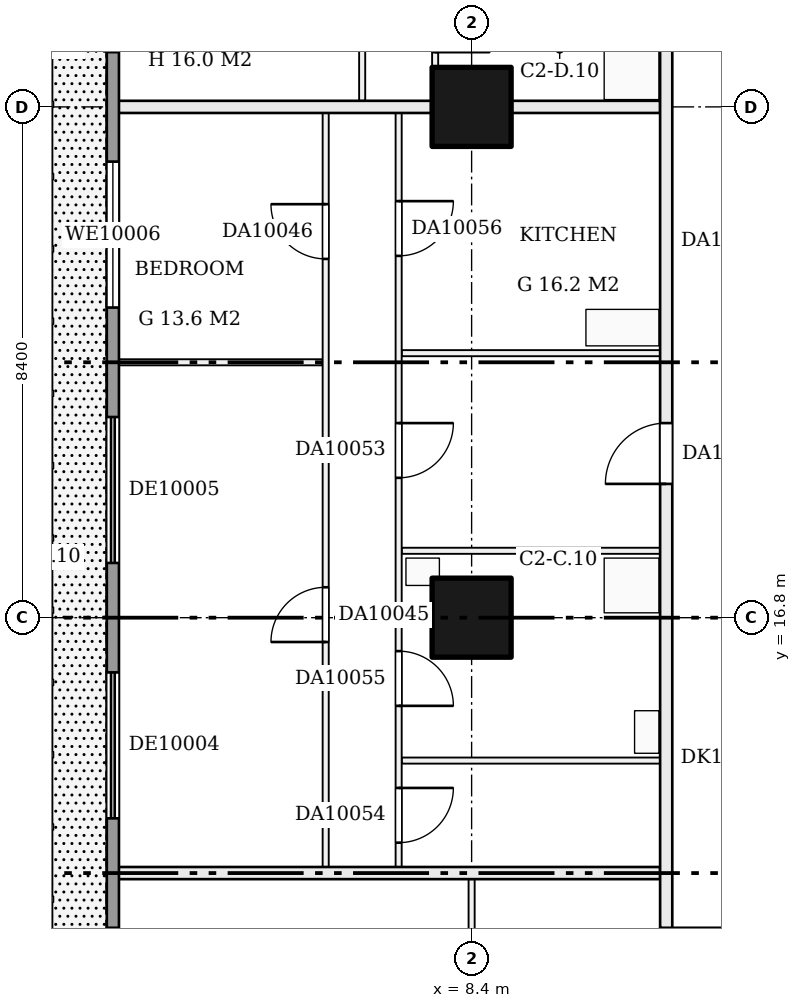
"""IFC4 building model, lengths in metres.
Left out: names, types, materials, properties, quantities, classifications, styles, units other than length and angle.
Written with IfcOpenShell. Run it as: python <this file> out.ifc"""

import sys

from ifc_helpers import new_model, si_unit, direction, frame, frame_2d, origin, origin_2d, place, context, subcontext, project, spatial, rectangle, extrude, element, fill, save


model = new_model("IFC4")
c1 = context("Model", 3, precision=1e-05, world=origin(), true_north=direction((0.0, 1.0)))
c2 = subcontext(c1, "Body", "Model", "MODEL_VIEW")
j1 = project(units=[si_unit("LENGTHUNIT", "METRE"), si_unit("PLANEANGLEUNIT", "RADIAN")], contexts=[c1])
p1 = place(None, origin())
s1 = spatial("IfcSite", under=j1, at=p1, CompositionType="ELEMENT")
p2 = place(p1, origin())
s2 = spatial("IfcBuilding", under=s1, at=p2, CompositionType="ELEMENT")
p3 = place(p2, frame((0.0, 0.0, 46.2)))
s3 = spatial("IfcBuildingStorey", under=s2, at=p3, CompositionType="ELEMENT", Elevation=46.2)
for number, where, z_axis, x_axis in (
    (1, (8.4, 16.8, 0.0), (0.0, 0.0, 1.0), (1.0, 0.0, 0.0)),
    (2, (8.4, 25.2, 0.0), (0.0, 0.0, 1.0), (1.0, 0.0, 0.0)),
):
    element("IfcColumn", number, at=place(p3, frame(where, z_axis=z_axis, x_axis=x_axis)), inside=s3, PredefinedType="COLUMN", context=c2, shape_type="SweptSolid", body=[
        extrude(rectangle(XDim=1.3, YDim=1.3, at=origin_2d()), origin(), (0.0, 0.0, 1.0), 3.22),
    ])
p4 = place(p3, frame((11.5, 11.6, 0.0), z_axis=(0.0, 0.0, 1.0), x_axis=(1.0, 0.0, 0.0)))
e3 = element("IfcWall", 3, at=p4, inside=s3, PredefinedType="PARTITIONING", context=c2, shape_type="SweptSolid", body=[
    extrude(rectangle(XDim=30.5, YDim=0.2, at=frame_2d((15.25, 0.0))), origin(), (0.0, 0.0, 1.0), 3.22),
])
p5 = place(p4, frame((1.6, 0.0, 0.0)))
e4 = element("IfcOpeningElement", 4, at=p5, cuts=e3, PredefinedType="OPENING", context=c2, shape_type="SweptSolid", body=[
    extrude(rectangle(XDim=1.0, YDim=2.1, at=frame_2d((0.5, 1.05))), frame((0.0, 0.11, 0.0), z_axis=(0.0, -1.0, 0.0), x_axis=(1.0, 0.0, 0.0)), (0.0, 0.0, 1.0), 0.22),
])
p6 = place(p4, frame((6.0, 0.0, 0.0)))
e5 = element("IfcOpeningElement", 5, at=p6, cuts=e3, PredefinedType="OPENING", context=c2, shape_type="SweptSolid", body=[
    extrude(rectangle(XDim=1.0, YDim=2.1, at=frame_2d((0.5, 1.05))), frame((0.0, 0.11, 0.0), z_axis=(0.0, -1.0, 0.0), x_axis=(1.0, 0.0, 0.0)), (0.0, 0.0, 1.0), 0.22),
])
p7 = place(p4, frame((14.7, 0.0, 0.0)))
e6 = element("IfcOpeningElement", 6, at=p7, cuts=e3, PredefinedType="OPENING", context=c2, shape_type="SweptSolid", body=[
    extrude(rectangle(XDim=1.0, YDim=2.1, at=frame_2d((0.5, 1.05))), frame((0.0, 0.11, 0.0), z_axis=(0.0, -1.0, 0.0), x_axis=(1.0, 0.0, 0.0)), (0.0, 0.0, 1.0), 0.22),
])
p8 = place(p4, frame((29.04, 0.0, 0.0)))
e7 = element("IfcOpeningElement", 7, at=p8, cuts=e3, PredefinedType="OPENING", context=c2, shape_type="SweptSolid", body=[
    extrude(rectangle(XDim=1.0, YDim=2.1, at=frame_2d((0.5, 1.05))), frame((0.0, 0.11, 0.0), z_axis=(0.0, -1.0, 0.0), x_axis=(1.0, 0.0, 0.0)), (0.0, 0.0, 1.0), 0.22),
])
p9 = place(p3, frame((2.5, 12.6, 0.0), z_axis=(0.0, 0.0, 1.0), x_axis=(1.0, 0.0, 0.0)))
e8 = element("IfcWall", 8, at=p9, inside=s3, PredefinedType="PARTITIONING", context=c2, shape_type="SweptSolid", body=[
    extrude(rectangle(XDim=9.0, YDim=0.2, at=frame_2d((4.5, 0.0))), origin(), (0.0, 0.0, 1.0), 3.22),
])
for number, where, z_axis, x_axis in (
    (9, (7.25, 14.45, 0.0), (0.0, 0.0, 1.0), (1.0, 0.0, 0.0)),
    (10, (7.25, 17.9, 0.0), (0.0, 0.0, 1.0), (1.0, 0.0, 0.0)),
):
    element("IfcWall", number, at=place(p3, frame(where, z_axis=z_axis, x_axis=x_axis)), inside=s3, PredefinedType="PARTITIONING", context=c2, shape_type="SweptSolid", body=[
        extrude(rectangle(XDim=4.25, YDim=0.1, at=frame_2d((2.125, 0.0))), origin(), (0.0, 0.0, 1.0), 3.22),
    ])
p10 = place(p3, frame((2.5, 21.0, 0.0), z_axis=(0.0, 0.0, 1.0), x_axis=(1.0, 0.0, 0.0)))
e11 = element("IfcWall", 11, at=p10, inside=s3, PredefinedType="PARTITIONING", context=c2, shape_type="SweptSolid", body=[
    extrude(rectangle(XDim=3.45, YDim=0.1, at=frame_2d((1.725, 0.0))), origin(), (0.0, 0.0, 1.0), 3.22),
])
p11 = place(p3, frame((7.25, 21.15, 0.0), z_axis=(0.0, 0.0, 1.0), x_axis=(1.0, 0.0, 0.0)))
e12 = element("IfcWall", 12, at=p11, inside=s3, PredefinedType="PARTITIONING", context=c2, shape_type="SweptSolid", body=[
    extrude(rectangle(XDim=4.25, YDim=0.1, at=frame_2d((2.125, 0.0))), origin(), (0.0, 0.0, 1.0), 3.22),
])
p12 = place(p3, frame((2.5, 25.2, 0.0), z_axis=(0.0, 0.0, 1.0), x_axis=(1.0, 0.0, 0.0)))
e13 = element("IfcWall", 13, at=p12, inside=s3, PredefinedType="PARTITIONING", context=c2, shape_type="SweptSolid", body=[
    extrude(rectangle(XDim=9.0, YDim=0.2, at=frame_2d((4.5, 0.0))), origin(), (0.0, 0.0, 1.0), 3.22),
])
p13 = place(p3, frame((6.0, 12.7, 0.0), z_axis=(0.0, 0.0, 1.0), x_axis=(0.0, 1.0, 0.0)))
e14 = element("IfcWall", 14, at=p13, inside=s3, PredefinedType="PARTITIONING", context=c2, shape_type="SweptSolid", body=[
    extrude(rectangle(XDim=12.4, YDim=0.1, at=frame_2d((6.2, 0.0))), origin(), (0.0, 0.0, 1.0), 3.22),
])
p14 = place(p13, frame((3.7, 0.0, 0.0)))
e15 = element("IfcOpeningElement", 15, at=p14, cuts=e14, PredefinedType="OPENING", context=c2, shape_type="SweptSolid", body=[
    extrude(rectangle(XDim=0.9, YDim=2.1, at=frame_2d((0.45, 1.05))), frame((0.0, 0.06, 0.0), z_axis=(0.0, -1.0, 0.0), x_axis=(1.0, 0.0, 0.0)), (0.0, 0.0, 1.0), 0.12),
])
p15 = place(p13, frame((10.0, 0.0, 0.0)))
e16 = element("IfcOpeningElement", 16, at=p15, cuts=e14, PredefinedType="OPENING", context=c2, shape_type="SweptSolid", body=[
    extrude(rectangle(XDim=0.9, YDim=2.1, at=frame_2d((0.45, 1.05))), frame((0.0, 0.06, 0.0), z_axis=(0.0, -1.0, 0.0), x_axis=(1.0, 0.0, 0.0)), (0.0, 0.0, 1.0), 0.12),
])
p16 = place(p3, frame((6.6, 25.3, 0.0), z_axis=(0.0, 0.0, 1.0), x_axis=(0.0, 1.0, 0.0)))
e17 = element("IfcWall", 17, at=p16, inside=s3, PredefinedType="PARTITIONING", context=c2, shape_type="SweptSolid", body=[
    extrude(rectangle(XDim=8.2, YDim=0.1, at=frame_2d((4.1, 0.0))), origin(), (0.0, 0.0, 1.0), 3.22),
])
p17 = place(p16, frame((1.5, 0.0, 0.0)))
e18 = element("IfcOpeningElement", 18, at=p17, cuts=e17, PredefinedType="OPENING", context=c2, shape_type="SweptSolid", body=[
    extrude(rectangle(XDim=0.9, YDim=2.1, at=frame_2d((0.45, 1.05))), frame((0.0, 0.06, 0.0), z_axis=(0.0, -1.0, 0.0), x_axis=(1.0, 0.0, 0.0)), (0.0, 0.0, 1.0), 0.12),
])
p18 = place(p16, frame((5.7, 0.0, 0.0)))
e19 = element("IfcOpeningElement", 19, at=p18, cuts=e17, PredefinedType="OPENING", context=c2, shape_type="SweptSolid", body=[
    extrude(rectangle(XDim=0.9, YDim=2.1, at=frame_2d((0.45, 1.05))), frame((0.0, 0.06, 0.0), z_axis=(0.0, -1.0, 0.0), x_axis=(1.0, 0.0, 0.0)), (0.0, 0.0, 1.0), 0.12),
])
p19 = place(p3, frame((7.2, 12.7, 0.0), z_axis=(0.0, 0.0, 1.0), x_axis=(0.0, 1.0, 0.0)))
e20 = element("IfcWall", 20, at=p19, inside=s3, PredefinedType="PARTITIONING", context=c2, shape_type="SweptSolid", body=[
    extrude(rectangle(XDim=12.4, YDim=0.1, at=frame_2d((6.2, 0.0))), origin(), (0.0, 0.0, 1.0), 3.22),
])
p20 = place(p19, frame((6.4, 0.0, 0.0)))
e21 = element("IfcOpeningElement", 21, at=p20, cuts=e20, PredefinedType="OPENING", context=c2, shape_type="SweptSolid", body=[
    extrude(rectangle(XDim=0.9, YDim=2.1, at=frame_2d((0.45, 1.05))), frame((0.0, 0.06, 0.0), z_axis=(0.0, -1.0, 0.0), x_axis=(1.0, 0.0, 0.0)), (0.0, 0.0, 1.0), 0.12),
])
p21 = place(p19, frame((0.4, 0.0, 0.0)))
e22 = element("IfcOpeningElement", 22, at=p21, cuts=e20, PredefinedType="OPENING", context=c2, shape_type="SweptSolid", body=[
    extrude(rectangle(XDim=0.9, YDim=2.1, at=frame_2d((0.45, 1.05))), frame((0.0, 0.06, 0.0), z_axis=(0.0, -1.0, 0.0), x_axis=(1.0, 0.0, 0.0)), (0.0, 0.0, 1.0), 0.12),
])
p22 = place(p19, frame((2.65, 0.0, 0.0)))
e23 = element("IfcOpeningElement", 23, at=p22, cuts=e20, PredefinedType="OPENING", context=c2, shape_type="SweptSolid", body=[
    extrude(rectangle(XDim=0.9, YDim=2.1, at=frame_2d((0.45, 1.05))), frame((0.0, 0.06, 0.0), z_axis=(0.0, -1.0, 0.0), x_axis=(1.0, 0.0, 0.0)), (0.0, 0.0, 1.0), 0.12),
])
p23 = place(p19, frame((10.05, 0.0, 0.0)))
e24 = element("IfcOpeningElement", 24, at=p23, cuts=e20, PredefinedType="OPENING", context=c2, shape_type="SweptSolid", body=[
    extrude(rectangle(XDim=0.9, YDim=2.1, at=frame_2d((0.45, 1.05))), frame((0.0, 0.06, 0.0), z_axis=(0.0, -1.0, 0.0), x_axis=(1.0, 0.0, 0.0)), (0.0, 0.0, 1.0), 0.12),
])
p24 = place(p3, frame((7.8, 25.3, 0.0), z_axis=(0.0, 0.0, 1.0), x_axis=(0.0, 1.0, 0.0)))
e25 = element("IfcWall", 25, at=p24, inside=s3, PredefinedType="PARTITIONING", context=c2, shape_type="SweptSolid", body=[
    extrude(rectangle(XDim=8.2, YDim=0.1, at=frame_2d((4.1, 0.0))), origin(), (0.0, 0.0, 1.0), 3.22),
])
p25 = place(p24, frame((6.533, 0.0, 0.0)))
e26 = element("IfcOpeningElement", 26, at=p25, cuts=e25, PredefinedType="OPENING", context=c2, shape_type="SweptSolid", body=[
    extrude(rectangle(XDim=0.9, YDim=2.1, at=frame_2d((0.45, 1.05))), frame((0.0, 0.06, 0.0), z_axis=(0.0, -1.0, 0.0), x_axis=(1.0, 0.0, 0.0)), (0.0, 0.0, 1.0), 0.12),
])
p26 = place(p24, frame((0.8, 0.0, 0.0)))
e27 = element("IfcOpeningElement", 27, at=p26, cuts=e25, PredefinedType="OPENING", context=c2, shape_type="SweptSolid", body=[
    extrude(rectangle(XDim=0.9, YDim=2.1, at=frame_2d((0.45, 1.05))), frame((0.0, 0.06, 0.0), z_axis=(0.0, -1.0, 0.0), x_axis=(1.0, 0.0, 0.0)), (0.0, 0.0, 1.0), 0.12),
])
p27 = place(p24, frame((3.767, 0.0, 0.0)))
e28 = element("IfcOpeningElement", 28, at=p27, cuts=e25, PredefinedType="OPENING", context=c2, shape_type="SweptSolid", body=[
    extrude(rectangle(XDim=0.9, YDim=2.1, at=frame_2d((0.45, 1.05))), frame((0.0, 0.06, 0.0), z_axis=(0.0, -1.0, 0.0), x_axis=(1.0, 0.0, 0.0)), (0.0, 0.0, 1.0), 0.12),
])
p28 = place(p3, frame((8.4, 9.1, 0.0), z_axis=(0.0, 0.0, 1.0), x_axis=(0.0, 1.0, 0.0)))
e29 = element("IfcWall", 29, at=p28, inside=s3, PredefinedType="PARTITIONING", context=c2, shape_type="SweptSolid", body=[
    extrude(rectangle(XDim=3.4, YDim=0.1, at=frame_2d((1.7, 0.0))), origin(), (0.0, 0.0, 1.0), 3.22),
])
p29 = place(p3, frame((11.6, 11.7, 0.0), z_axis=(0.0, 0.0, 1.0), x_axis=(0.0, 1.0, 0.0)))
e30 = element("IfcWall", 30, at=p29, inside=s3, PredefinedType="PARTITIONING", context=c2, shape_type="SweptSolid", body=[
    extrude(rectangle(XDim=30.3, YDim=0.2, at=frame_2d((15.15, 0.0))), origin(), (0.0, 0.0, 1.0), 3.22),
])
p30 = place(p29, frame((7.3, 0.0, 0.0)))
e31 = element("IfcOpeningElement", 31, at=p30, cuts=e30, PredefinedType="OPENING", context=c2, shape_type="SweptSolid", body=[
    extrude(rectangle(XDim=1.0, YDim=2.1, at=frame_2d((0.5, 1.05))), frame((0.0, 0.11, 0.0), z_axis=(0.0, -1.0, 0.0), x_axis=(1.0, 0.0, 0.0)), (0.0, 0.0, 1.0), 0.22),
])
p31 = place(p29, frame((20.133, 0.0, 0.0)))
e32 = element("IfcOpeningElement", 32, at=p31, cuts=e30, PredefinedType="OPENING", context=c2, shape_type="SweptSolid", body=[
    extrude(rectangle(XDim=1.0, YDim=2.1, at=frame_2d((0.5, 1.05))), frame((0.0, 0.11, 0.0), z_axis=(0.0, -1.0, 0.0), x_axis=(1.0, 0.0, 0.0)), (0.0, 0.0, 1.0), 0.22),
])
p32 = place(p29, frame((22.6, 0.0, 0.0)))
e33 = element("IfcOpeningElement", 33, at=p32, cuts=e30, PredefinedType="OPENING", context=c2, shape_type="SweptSolid", body=[
    extrude(rectangle(XDim=1.0, YDim=2.1, at=frame_2d((0.5, 1.05))), frame((0.0, 0.11, 0.0), z_axis=(0.0, -1.0, 0.0), x_axis=(1.0, 0.0, 0.0)), (0.0, 0.0, 1.0), 0.22),
])
p33 = place(p3, frame((2.5, 53.8, 0.0), z_axis=(0.0, 0.0, 1.0), x_axis=(0.0, -1.0, 0.0)))
e34 = element("IfcWall", 34, at=p33, inside=s3, PredefinedType="SOLIDWALL", context=c2, shape_type="SweptSolid", body=[
    extrude(rectangle(XDim=48.8, YDim=0.2, at=frame_2d((24.4, 0.0))), origin(), (0.0, 0.0, 1.0), 3.22),
])
p34 = place(p33, frame((46.1, 0.0, 0.0)))
e35 = element("IfcOpeningElement", 35, at=p34, cuts=e34, PredefinedType="OPENING", context=c2, shape_type="SweptSolid", body=[
    extrude(rectangle(XDim=2.4, YDim=2.2, at=frame_2d((1.2, 1.1))), frame((0.0, 0.11, 0.0), z_axis=(0.0, -1.0, 0.0), x_axis=(1.0, 0.0, 0.0)), (0.0, 0.0, 1.0), 0.22),
])
p35 = place(p33, frame((42.1, 0.0, 0.0)))
e36 = element("IfcOpeningElement", 36, at=p35, cuts=e34, PredefinedType="OPENING", context=c2, shape_type="SweptSolid", body=[
    extrude(rectangle(XDim=2.4, YDim=2.2, at=frame_2d((1.2, 1.1))), frame((0.0, 0.11, 0.0), z_axis=(0.0, -1.0, 0.0), x_axis=(1.0, 0.0, 0.0)), (0.0, 0.0, 1.0), 0.22),
])
p36 = place(p33, frame((37.9, 0.0, 0.0)))
e37 = element("IfcOpeningElement", 37, at=p36, cuts=e34, PredefinedType="OPENING", context=c2, shape_type="SweptSolid", body=[
    extrude(rectangle(XDim=2.4, YDim=2.2, at=frame_2d((1.2, 1.1))), frame((0.0, 0.11, 0.0), z_axis=(0.0, -1.0, 0.0), x_axis=(1.0, 0.0, 0.0)), (0.0, 0.0, 1.0), 0.22),
])
p37 = place(p33, frame((33.7, 0.0, 0.0)))
e38 = element("IfcOpeningElement", 38, at=p37, cuts=e34, PredefinedType="OPENING", context=c2, shape_type="SweptSolid", body=[
    extrude(rectangle(XDim=2.4, YDim=2.2, at=frame_2d((1.2, 1.1))), frame((0.0, 0.11, 0.0), z_axis=(0.0, -1.0, 0.0), x_axis=(1.0, 0.0, 0.0)), (0.0, 0.0, 1.0), 0.22),
])
p38 = place(p33, frame((29.5, 0.0, 0.9)))
e39 = element("IfcOpeningElement", 39, at=p38, cuts=e34, PredefinedType="OPENING", context=c2, shape_type="SweptSolid", body=[
    extrude(rectangle(XDim=2.4, YDim=1.5, at=frame_2d((1.2, 0.75))), frame((0.0, 0.11, 0.0), z_axis=(0.0, -1.0, 0.0), x_axis=(1.0, 0.0, 0.0)), (0.0, 0.0, 1.0), 0.22),
])
p39 = place(p33, frame((25.3, 0.0, 0.9)))
e40 = element("IfcOpeningElement", 40, at=p39, cuts=e34, PredefinedType="OPENING", context=c2, shape_type="SweptSolid", body=[
    extrude(rectangle(XDim=2.4, YDim=1.5, at=frame_2d((1.2, 0.75))), frame((0.0, 0.11, 0.0), z_axis=(0.0, -1.0, 0.0), x_axis=(1.0, 0.0, 0.0)), (0.0, 0.0, 1.0), 0.22),
])
p40 = place(p33, frame((21.1, 0.0, 0.0)))
e41 = element("IfcOpeningElement", 41, at=p40, cuts=e34, PredefinedType="OPENING", context=c2, shape_type="SweptSolid", body=[
    extrude(rectangle(XDim=2.4, YDim=2.2, at=frame_2d((1.2, 1.1))), frame((0.0, 0.11, 0.0), z_axis=(0.0, -1.0, 0.0), x_axis=(1.0, 0.0, 0.0)), (0.0, 0.0, 1.0), 0.22),
])
p41 = place(p33, frame((16.9, 0.0, 0.0)))
e42 = element("IfcOpeningElement", 42, at=p41, cuts=e34, PredefinedType="OPENING", context=c2, shape_type="SweptSolid", body=[
    extrude(rectangle(XDim=2.4, YDim=2.2, at=frame_2d((1.2, 1.1))), frame((0.0, 0.11, 0.0), z_axis=(0.0, -1.0, 0.0), x_axis=(1.0, 0.0, 0.0)), (0.0, 0.0, 1.0), 0.22),
])
p42 = place(p33, frame((12.7, 0.0, 0.9)))
e43 = element("IfcOpeningElement", 43, at=p42, cuts=e34, PredefinedType="OPENING", context=c2, shape_type="SweptSolid", body=[
    extrude(rectangle(XDim=2.4, YDim=1.5, at=frame_2d((1.2, 0.75))), frame((0.0, 0.11, 0.0), z_axis=(0.0, -1.0, 0.0), x_axis=(1.0, 0.0, 0.0)), (0.0, 0.0, 1.0), 0.22),
])
p43 = place(p33, frame((8.5, 0.0, 0.9)))
e44 = element("IfcOpeningElement", 44, at=p43, cuts=e34, PredefinedType="OPENING", context=c2, shape_type="SweptSolid", body=[
    extrude(rectangle(XDim=2.4, YDim=1.5, at=frame_2d((1.2, 0.75))), frame((0.0, 0.11, 0.0), z_axis=(0.0, -1.0, 0.0), x_axis=(1.0, 0.0, 0.0)), (0.0, 0.0, 1.0), 0.22),
])
p44 = place(p33, frame((4.3, 0.0, 0.9)))
e45 = element("IfcOpeningElement", 45, at=p44, cuts=e34, PredefinedType="OPENING", context=c2, shape_type="SweptSolid", body=[
    extrude(rectangle(XDim=2.4, YDim=1.5, at=frame_2d((1.2, 0.75))), frame((0.0, 0.11, 0.0), z_axis=(0.0, -1.0, 0.0), x_axis=(1.0, 0.0, 0.0)), (0.0, 0.0, 1.0), 0.22),
])
p45 = place(p33, frame((0.3, 0.0, 0.0)))
e46 = element("IfcOpeningElement", 46, at=p45, cuts=e34, PredefinedType="OPENING", context=c2, shape_type="SweptSolid", body=[
    extrude(rectangle(XDim=2.4, YDim=2.2, at=frame_2d((1.2, 1.1))), frame((0.0, 0.11, 0.0), z_axis=(0.0, -1.0, 0.0), x_axis=(1.0, 0.0, 0.0)), (0.0, 0.0, 1.0), 0.22),
])
p46 = place(p14, origin())
e47 = element("IfcDoor", 47, at=p46, inside=s3, OperationType="SINGLE_SWING_LEFT", PredefinedType="DOOR", context=c2, shape_type="SweptSolid", body=[
    extrude(rectangle(XDim=0.9, YDim=2.1, at=frame_2d((0.45, 1.05))), frame((0.0, 0.025, 0.0), z_axis=(0.0, -1.0, 0.0), x_axis=(1.0, 0.0, 0.0)), (0.0, 0.0, 1.0), 0.05),
])
fill(e15, e47)
p47 = place(p15, origin())
e48 = element("IfcDoor", 48, at=p47, inside=s3, OperationType="SINGLE_SWING_RIGHT", PredefinedType="DOOR", context=c2, shape_type="SweptSolid", body=[
    extrude(rectangle(XDim=0.9, YDim=2.1, at=frame_2d((0.45, 1.05))), frame((0.0, 0.025, 0.0), z_axis=(0.0, -1.0, 0.0), x_axis=(1.0, 0.0, 0.0)), (0.0, 0.0, 1.0), 0.05),
])
fill(e16, e48)
p48 = place(p20, frame((0.9, 0.0, 0.0), z_axis=(0.0, 0.0, 1.0), x_axis=(-1.0, 0.0, 0.0)))
e49 = element("IfcDoor", 49, at=p48, inside=s3, OperationType="SINGLE_SWING_LEFT", PredefinedType="DOOR", context=c2, shape_type="SweptSolid", body=[
    extrude(rectangle(XDim=0.9, YDim=2.1, at=frame_2d((0.45, 1.05))), frame((0.0, 0.025, 0.0), z_axis=(0.0, -1.0, 0.0), x_axis=(1.0, 0.0, 0.0)), (0.0, 0.0, 1.0), 0.05),
])
fill(e21, e49)
p49 = place(p21, frame((0.9, 0.0, 0.0), z_axis=(0.0, 0.0, 1.0), x_axis=(-1.0, 0.0, 0.0)))
e50 = element("IfcDoor", 50, at=p49, inside=s3, OperationType="SINGLE_SWING_LEFT", PredefinedType="DOOR", context=c2, shape_type="SweptSolid", body=[
    extrude(rectangle(XDim=0.9, YDim=2.1, at=frame_2d((0.45, 1.05))), frame((0.0, 0.025, 0.0), z_axis=(0.0, -1.0, 0.0), x_axis=(1.0, 0.0, 0.0)), (0.0, 0.0, 1.0), 0.05),
])
fill(e22, e50)
p50 = place(p22, frame((0.9, 0.0, 0.0), z_axis=(0.0, 0.0, 1.0), x_axis=(-1.0, 0.0, 0.0)))
e51 = element("IfcDoor", 51, at=p50, inside=s3, OperationType="SINGLE_SWING_RIGHT", PredefinedType="DOOR", context=c2, shape_type="SweptSolid", body=[
    extrude(rectangle(XDim=0.9, YDim=2.1, at=frame_2d((0.45, 1.05))), frame((0.0, 0.025, 0.0), z_axis=(0.0, -1.0, 0.0), x_axis=(1.0, 0.0, 0.0)), (0.0, 0.0, 1.0), 0.05),
])
fill(e23, e51)
p51 = place(p23, frame((0.9, 0.0, 0.0), z_axis=(0.0, 0.0, 1.0), x_axis=(-1.0, 0.0, 0.0)))
e52 = element("IfcDoor", 52, at=p51, inside=s3, OperationType="SINGLE_SWING_LEFT", PredefinedType="DOOR", context=c2, shape_type="SweptSolid", body=[
    extrude(rectangle(XDim=0.9, YDim=2.1, at=frame_2d((0.45, 1.05))), frame((0.0, 0.025, 0.0), z_axis=(0.0, -1.0, 0.0), x_axis=(1.0, 0.0, 0.0)), (0.0, 0.0, 1.0), 0.05),
])
fill(e24, e52)
p52 = place(p30, origin())
e53 = element("IfcDoor", 53, at=p52, inside=s3, OperationType="SINGLE_SWING_LEFT", PredefinedType="DOOR", context=c2, shape_type="SweptSolid", body=[
    extrude(rectangle(XDim=1.0, YDim=2.1, at=frame_2d((0.5, 1.05))), frame((0.0, 0.025, 0.0), z_axis=(0.0, -1.0, 0.0), x_axis=(1.0, 0.0, 0.0)), (0.0, 0.0, 1.0), 0.05),
])
fill(e31, e53)
p53 = place(p36, origin())
e54 = element("IfcDoor", 54, at=p53, inside=s3, OperationType="DOUBLE_DOOR_SLIDING", PredefinedType="DOOR", context=c2, shape_type="SweptSolid", body=[
    extrude(rectangle(XDim=2.4, YDim=2.2, at=frame_2d((1.2, 1.1))), frame((0.0, 0.025, 0.0), z_axis=(0.0, -1.0, 0.0), x_axis=(1.0, 0.0, 0.0)), (0.0, 0.0, 1.0), 0.05),
])
fill(e37, e54)
p54 = place(p37, origin())
e55 = element("IfcDoor", 55, at=p54, inside=s3, OperationType="DOUBLE_DOOR_SLIDING", PredefinedType="DOOR", context=c2, shape_type="SweptSolid", body=[
    extrude(rectangle(XDim=2.4, YDim=2.2, at=frame_2d((1.2, 1.1))), frame((0.0, 0.025, 0.0), z_axis=(0.0, -1.0, 0.0), x_axis=(1.0, 0.0, 0.0)), (0.0, 0.0, 1.0), 0.05),
])
fill(e38, e55)
p55 = place(p38, origin())
e56 = element("IfcWindow", 56, at=p55, inside=s3, PartitioningType="SINGLE_PANEL", PredefinedType="WINDOW", context=c2, shape_type="SweptSolid", body=[
    extrude(rectangle(XDim=2.4, YDim=1.5, at=frame_2d((1.2, 0.75))), frame((0.0, 0.03, 0.0), z_axis=(0.0, -1.0, 0.0), x_axis=(1.0, 0.0, 0.0)), (0.0, 0.0, 1.0), 0.06),
])
fill(e39, e56)
save(model, sys.argv[1])
